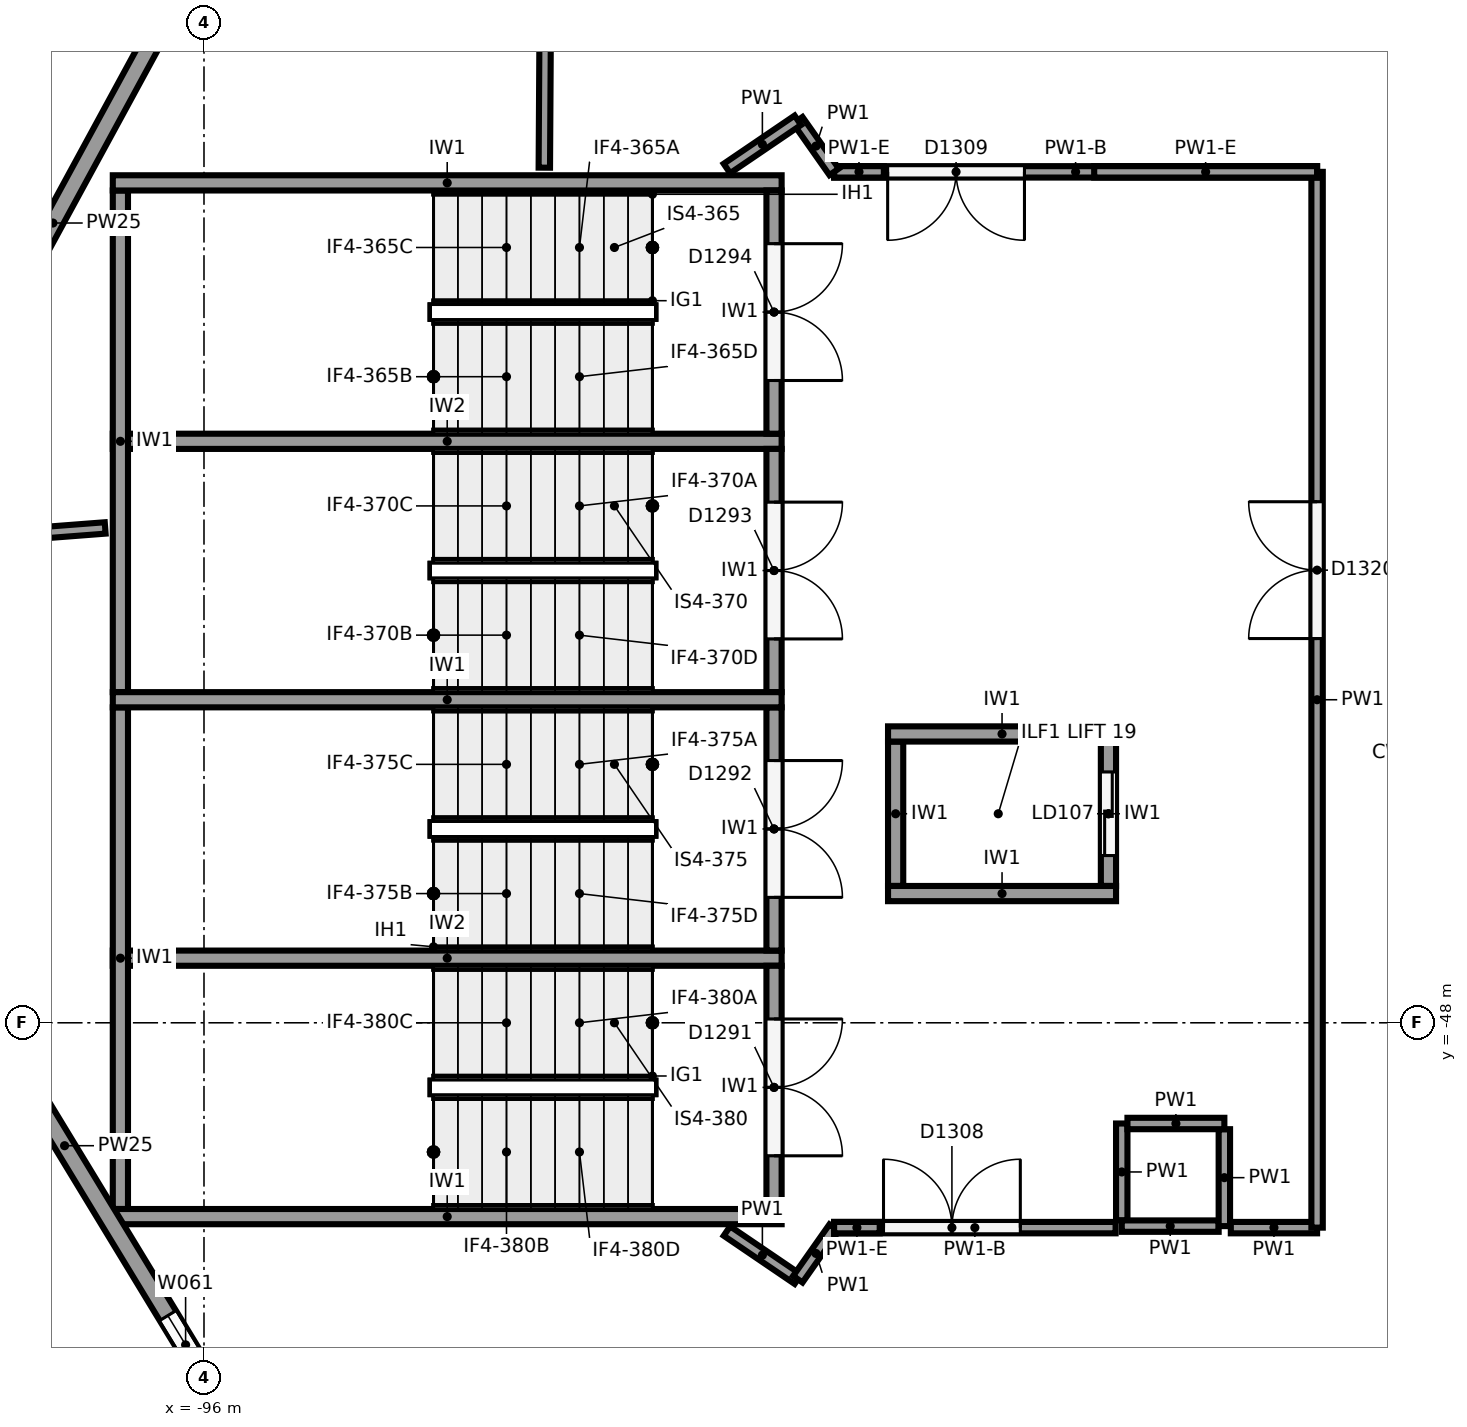
"""IFC4 building model, lengths in metres.
Left out: names, types, materials, properties, quantities, classifications, styles, units other than length and angle.
Written with IfcOpenShell. Run it as: python <this file> out.ifc"""

import sys

from ifc_helpers import new_model, si_unit, direction, frame, frame_2d, origin, origin_2d, place, context, subcontext, project, spatial, rectangle, circle, extrude, element, fill, save


model = new_model("IFC4")
c1 = context("Model", 3, precision=1e-05, world=origin(), true_north=direction((0.0, 1.0)))
c2 = subcontext(c1, "Body", "Model", "MODEL_VIEW")
j1 = project(units=[si_unit("LENGTHUNIT", "METRE"), si_unit("PLANEANGLEUNIT", "RADIAN")], contexts=[c1])
p1 = place(None, origin())
s1 = spatial("IfcSite", under=j1, at=p1, CompositionType="ELEMENT")
p2 = place(p1, origin())
s2 = spatial("IfcBuilding", under=s1, at=p2, CompositionType="ELEMENT")
p3 = place(p2, frame((0.0, 0.0, 18.0)))
s3 = spatial("IfcBuildingStorey", under=s2, at=p3, CompositionType="ELEMENT", Elevation=18.0)
p4 = place(p3, frame((-84.884, -42.562, 0.0), z_axis=(0.0, 0.0, 1.0), x_axis=(1.0, 0.0, 0.0)))
e1 = element("IfcColumn", 1, at=p4, inside=s3, PredefinedType="COLUMN", context=c2, shape_type="SweptSolid", body=[
    extrude(circle(Radius=0.6, at=origin_2d()), origin(), (0.0, 0.0, 1.0), 6.0),
])
p5 = place(p3, frame((-101.161, -43.311, 0.0), z_axis=(0.0, 0.0, 1.0), x_axis=(0.477867771117, 0.878431780691, 0.0)))
e2 = element("IfcWall", 2, at=p5, inside=s3, PredefinedType="SOLIDWALL", context=c2, shape_type="SweptSolid", body=[
    extrude(rectangle(XDim=13.28, YDim=0.25, at=frame_2d((6.64, 0.0))), origin(), (0.0, 0.0, 1.0), 4.3),
])
p6 = place(p3, frame((-94.528, -55.057, 0.0), z_axis=(0.0, 0.0, 1.0), x_axis=(-0.519362860044, 0.854553813172, 0.0)))
e3 = element("IfcWall", 3, at=p6, inside=s3, PredefinedType="SOLIDWALL", context=c2, shape_type="SweptSolid", body=[
    extrude(rectangle(XDim=12.732, YDim=0.25, at=frame_2d((6.366, 0.0))), origin(), (0.0, 0.0, 1.0), 4.3),
])
p7 = place(p6, frame((0.75, 0.0, 1.0)))
e4 = element("IfcOpeningElement", 4, at=p7, cuts=e3, PredefinedType="OPENING", context=c2, shape_type="SweptSolid", body=[
    extrude(rectangle(XDim=0.9, YDim=3.25, at=frame_2d((0.45, 1.625))), frame((0.0, 0.135, 0.0), z_axis=(0.0, -1.0, 0.0), x_axis=(1.0, 0.0, 0.0)), (0.0, 0.0, 1.0), 0.27),
])
p8 = place(p6, frame((2.851, 0.0, 1.0)))
e5 = element("IfcOpeningElement", 5, at=p8, cuts=e3, PredefinedType="OPENING", context=c2, shape_type="SweptSolid", body=[
    extrude(rectangle(XDim=0.9, YDim=3.25, at=frame_2d((0.45, 1.625))), frame((0.0, 0.135, 0.0), z_axis=(0.0, -1.0, 0.0), x_axis=(1.0, 0.0, 0.0)), (0.0, 0.0, 1.0), 0.27),
])
p9 = place(p6, frame((11.25, 0.0, 1.0)))
e6 = element("IfcOpeningElement", 6, at=p9, cuts=e3, PredefinedType="OPENING", context=c2, shape_type="SweptSolid", body=[
    extrude(rectangle(XDim=0.9, YDim=3.25, at=frame_2d((0.45, 1.625))), frame((0.0, 0.135, 0.0), z_axis=(0.0, -1.0, 0.0), x_axis=(1.0, 0.0, 0.0)), (0.0, 0.0, 1.0), 0.27),
])
for number, where, z_axis, x_axis in (
    (7, (-97.2, -36.95, 0.0), (0.0, 0.0, 1.0), (1.0, 0.0, 0.0)),
    (8, (-97.2, -43.75, 0.0), (0.0, 0.0, 1.0), (1.0, 0.0, 0.0)),
    (9, (-97.2, -50.55, 0.0), (0.0, 0.0, 1.0), (1.0, 0.0, 0.0)),
):
    element("IfcWall", number, at=place(p3, frame(where, z_axis=z_axis, x_axis=x_axis)), inside=s3, PredefinedType="SHEAR", context=c2, shape_type="SweptSolid", body=[
        extrude(rectangle(XDim=8.8, YDim=0.2, at=frame_2d((4.4, 0.0))), origin(), (0.0, 0.0, 1.0), 5.6),
    ])
for number, where, z_axis, x_axis in (
    (10, (-97.1, -37.05, 0.0), (0.0, 0.0, 1.0), (0.0, -1.0, 0.0)),
    (11, (-97.1, -43.85, 0.0), (0.0, 0.0, 1.0), (0.0, -1.0, 0.0)),
):
    element("IfcWall", number, at=place(p3, frame(where, z_axis=z_axis, x_axis=x_axis)), inside=s3, PredefinedType="SHEAR", context=c2, shape_type="SweptSolid", body=[
        extrude(rectangle(XDim=6.6, YDim=0.2, at=frame_2d((3.3, 0.0))), origin(), (0.0, 0.0, 1.0), 5.6),
    ])
for number, where, z_axis, x_axis in (
    (12, (-97.2, -40.35, 0.0), (0.0, 0.0, 1.0), (1.0, 0.0, 0.0)),
    (13, (-97.2, -47.15, 0.0), (0.0, 0.0, 1.0), (1.0, 0.0, 0.0)),
):
    element("IfcWall", number, at=place(p3, frame(where, z_axis=z_axis, x_axis=x_axis)), inside=s3, PredefinedType="SHEAR", context=c2, shape_type="SweptSolid", body=[
        extrude(rectangle(XDim=8.8, YDim=0.2, at=frame_2d((4.4, 0.0))), origin(), (0.0, 0.0, 1.0), 5.6),
    ])
p10 = place(p3, frame((-88.5, -37.05, 0.0), z_axis=(0.0, 0.0, 1.0), x_axis=(0.0, -1.0, 0.0)))
e14 = element("IfcWall", 14, at=p10, inside=s3, PredefinedType="SHEAR", context=c2, shape_type="SweptSolid", body=[
    extrude(rectangle(XDim=3.2, YDim=0.2, at=frame_2d((1.6, 0.0))), origin(), (0.0, 0.0, 1.0), 5.6),
])
p11 = place(p10, frame((0.7, 0.0, 0.0)))
e15 = element("IfcOpeningElement", 15, at=p11, cuts=e14, PredefinedType="OPENING", context=c2, shape_type="SweptSolid", body=[
    extrude(rectangle(XDim=1.8, YDim=2.1, at=frame_2d((0.9, 1.05))), frame((0.0, 0.11, 0.0), z_axis=(0.0, -1.0, 0.0), x_axis=(1.0, 0.0, 0.0)), (0.0, 0.0, 1.0), 0.22),
])
p12 = place(p3, frame((-88.5, -40.45, 0.0), z_axis=(0.0, 0.0, 1.0), x_axis=(0.0, -1.0, 0.0)))
e16 = element("IfcWall", 16, at=p12, inside=s3, PredefinedType="SHEAR", context=c2, shape_type="SweptSolid", body=[
    extrude(rectangle(XDim=3.2, YDim=0.2, at=frame_2d((1.6, 0.0))), origin(), (0.0, 0.0, 1.0), 5.6),
])
p13 = place(p12, frame((0.7, 0.0, 0.0)))
e17 = element("IfcOpeningElement", 17, at=p13, cuts=e16, PredefinedType="OPENING", context=c2, shape_type="SweptSolid", body=[
    extrude(rectangle(XDim=1.8, YDim=2.1, at=frame_2d((0.9, 1.05))), frame((0.0, 0.11, 0.0), z_axis=(0.0, -1.0, 0.0), x_axis=(1.0, 0.0, 0.0)), (0.0, 0.0, 1.0), 0.22),
])
p14 = place(p3, frame((-88.5, -43.85, 0.0), z_axis=(0.0, 0.0, 1.0), x_axis=(0.0, -1.0, 0.0)))
e18 = element("IfcWall", 18, at=p14, inside=s3, PredefinedType="SHEAR", context=c2, shape_type="SweptSolid", body=[
    extrude(rectangle(XDim=3.2, YDim=0.2, at=frame_2d((1.6, 0.0))), origin(), (0.0, 0.0, 1.0), 5.6),
])
p15 = place(p14, frame((0.7, 0.0, 0.0)))
e19 = element("IfcOpeningElement", 19, at=p15, cuts=e18, PredefinedType="OPENING", context=c2, shape_type="SweptSolid", body=[
    extrude(rectangle(XDim=1.8, YDim=2.1, at=frame_2d((0.9, 1.05))), frame((0.0, 0.11, 0.0), z_axis=(0.0, -1.0, 0.0), x_axis=(1.0, 0.0, 0.0)), (0.0, 0.0, 1.0), 0.22),
])
p16 = place(p3, frame((-88.5, -47.25, 0.0), z_axis=(0.0, 0.0, 1.0), x_axis=(0.0, -1.0, 0.0)))
e20 = element("IfcWall", 20, at=p16, inside=s3, PredefinedType="SHEAR", context=c2, shape_type="SweptSolid", body=[
    extrude(rectangle(XDim=3.2, YDim=0.2, at=frame_2d((1.6, 0.0))), origin(), (0.0, 0.0, 1.0), 5.6),
])
p17 = place(p16, frame((0.7, 0.0, 0.0)))
e21 = element("IfcOpeningElement", 21, at=p17, cuts=e20, PredefinedType="OPENING", context=c2, shape_type="SweptSolid", body=[
    extrude(rectangle(XDim=1.8, YDim=2.1, at=frame_2d((0.9, 1.05))), frame((0.0, 0.11, 0.0), z_axis=(0.0, -1.0, 0.0), x_axis=(1.0, 0.0, 0.0)), (0.0, 0.0, 1.0), 0.22),
])
for number, where, z_axis, x_axis in (
    (22, (-87.0, -44.2, 0.0), (0.0, 0.0, 1.0), (1.0, 0.0, 0.0)),
    (23, (-87.0, -46.3, 0.0), (0.0, 0.0, 1.0), (1.0, 0.0, 0.0)),
):
    element("IfcWall", number, at=place(p3, frame(where, z_axis=z_axis, x_axis=x_axis)), inside=s3, PredefinedType="SHEAR", context=c2, shape_type="SweptSolid", body=[
        extrude(rectangle(XDim=3.0, YDim=0.2, at=frame_2d((1.5, 0.0))), origin(), (0.0, 0.0, 1.0), 5.6),
    ])
p18 = place(p3, frame((-86.9, -44.3, 0.0), z_axis=(0.0, 0.0, 1.0), x_axis=(0.0, -1.0, 0.0)))
e24 = element("IfcWall", 24, at=p18, inside=s3, PredefinedType="SHEAR", context=c2, shape_type="SweptSolid", body=[
    extrude(rectangle(XDim=1.9, YDim=0.2, at=frame_2d((0.95, 0.0))), origin(), (0.0, 0.0, 1.0), 5.6),
])
p19 = place(p3, frame((-84.1, -44.3, 0.0), z_axis=(0.0, 0.0, 1.0), x_axis=(0.0, -1.0, 0.0)))
e25 = element("IfcWall", 25, at=p19, inside=s3, PredefinedType="SHEAR", context=c2, shape_type="SweptSolid", body=[
    extrude(rectangle(XDim=1.9, YDim=0.2, at=frame_2d((0.95, 0.0))), origin(), (0.0, 0.0, 1.0), 5.6),
])
p20 = place(p19, frame((0.4, 0.0, 0.0)))
e26 = element("IfcOpeningElement", 26, at=p20, cuts=e25, PredefinedType="OPENING", context=c2, shape_type="SweptSolid", body=[
    extrude(rectangle(XDim=1.1, YDim=2.1, at=frame_2d((0.55, 1.05))), frame((0.0, 0.11, 0.0), z_axis=(0.0, -1.0, 0.0), x_axis=(1.0, 0.0, 0.0)), (0.0, 0.0, 1.0), 0.22),
])
p21 = place(p3, frame((-97.3, -41.49, 0.0), z_axis=(0.0, 0.0, 1.0), x_axis=(-0.99706720675, -0.076530942913, 0.0)))
e27 = element("IfcWall", 27, at=p21, inside=s3, PredefinedType="PARTITIONING", context=c2, shape_type="SweptSolid", body=[
    extrude(rectangle(XDim=2.255, YDim=0.15, at=frame_2d((1.128, 0.0))), origin(), (0.0, 0.0, 1.0), 5.6),
])
p22 = place(p3, frame((-91.49, -31.489, 0.0), z_axis=(0.0, 0.0, 1.0), x_axis=(-0.006125459352, -0.999981239198, 0.0)))
e28 = element("IfcWall", 28, at=p22, inside=s3, PredefinedType="PARTITIONING", context=c2, shape_type="SweptSolid", body=[
    extrude(rectangle(XDim=5.261, YDim=0.15, at=frame_2d((2.63, 0.0))), origin(), (0.0, 0.0, 1.0), 5.6),
])
for number, where, z_axis, x_axis in (
    (29, (-83.925, -49.325, 0.0), (0.0, 0.0, 1.0), (0.0, -1.0, 0.0)),
    (30, (-83.925, -50.675, 0.0), (0.0, 0.0, 1.0), (1.0, 0.0, 0.0)),
    (31, (-82.575, -50.675, 0.0), (0.0, 0.0, 1.0), (0.0, 1.0, 0.0)),
    (32, (-82.575, -49.325, 0.0), (0.0, 0.0, 1.0), (-1.0, 0.0, 0.0)),
):
    element("IfcWall", number, at=place(p3, frame(where, z_axis=z_axis, x_axis=x_axis)), inside=s3, PredefinedType="PARTITIONING", context=c2, shape_type="SweptSolid", body=[
        extrude(rectangle(XDim=1.275, YDim=0.15, at=frame_2d((0.638, 0.0))), origin(), (0.0, 0.0, 1.0), 5.6),
    ])
p23 = place(p3, frame((-89.12, -50.74, 0.0), z_axis=(0.0, 0.0, 1.0), x_axis=(0.827055308354, -0.562120553728, 0.0)))
e33 = element("IfcWall", 33, at=p23, inside=s3, PredefinedType="PARTITIONING", context=c2, shape_type="SweptSolid", body=[
    extrude(rectangle(XDim=1.128, YDim=0.15, at=frame_2d((0.564, 0.0))), origin(), (0.0, 0.0, 1.0), 5.6),
])
p24 = place(p3, frame((-88.187, -51.374, 0.0), z_axis=(0.0, 0.0, 1.0), x_axis=(0.575376756214, 0.817888493872, 0.0)))
e34 = element("IfcWall", 34, at=p24, inside=s3, PredefinedType="PARTITIONING", context=c2, shape_type="SweptSolid", body=[
    extrude(rectangle(XDim=0.83, YDim=0.15, at=frame_2d((0.415, 0.0))), origin(), (0.0, 0.0, 1.0), 5.6),
])
p25 = place(p3, frame((-87.709, -50.695, 0.0), z_axis=(0.0, 0.0, 1.0), x_axis=(1.0, 0.0, 0.0)))
e35 = element("IfcWall", 35, at=p25, inside=s3, PredefinedType="PARTITIONING", context=c2, shape_type="SweptSolid", body=[
    extrude(rectangle(XDim=3.704, YDim=0.15, at=frame_2d((1.852, 0.0))), origin(), (0.0, 0.0, 1.0), 4.5),
])
p26 = place(p25, frame((0.65, 0.0, 0.0)))
e36 = element("IfcOpeningElement", 36, at=p26, cuts=e35, PredefinedType="OPENING", context=c2, shape_type="SweptSolid", body=[
    extrude(rectangle(XDim=1.8, YDim=2.1, at=frame_2d((0.9, 1.05))), frame((0.0, 0.085, 0.0), z_axis=(0.0, -1.0, 0.0), x_axis=(1.0, 0.0, 0.0)), (0.0, 0.0, 1.0), 0.17),
])
p27 = place(p3, frame((-87.709, -50.695, 4.5), z_axis=(0.0, 0.0, 1.0), x_axis=(1.0, 0.0, 0.0)))
e37 = element("IfcWall", 37, at=p27, inside=s3, PredefinedType="PARTITIONING", context=c2, shape_type="SweptSolid", body=[
    extrude(rectangle(XDim=0.6, YDim=0.15, at=frame_2d((0.3, 0.0))), origin(), (0.0, 0.0, 1.0), 1.1),
])
p28 = place(p3, frame((-82.49, -50.695, 0.0), z_axis=(0.0, 0.0, 1.0), x_axis=(1.0, 0.0, 0.0)))
e38 = element("IfcWall", 38, at=p28, inside=s3, PredefinedType="PARTITIONING", context=c2, shape_type="SweptSolid", body=[
    extrude(rectangle(XDim=1.135, YDim=0.15, at=frame_2d((0.567, 0.0))), origin(), (0.0, 0.0, 1.0), 5.6),
])
p29 = place(p3, frame((-81.355, -50.695, 0.0), z_axis=(0.0, 0.0, 1.0), x_axis=(0.0, 1.0, 0.0)))
e39 = element("IfcWall", 39, at=p29, inside=s3, PredefinedType="PARTITIONING", context=c2, shape_type="SweptSolid", body=[
    extrude(rectangle(XDim=13.89, YDim=0.15, at=frame_2d((6.945, 0.0))), origin(), (0.0, 0.0, 1.0), 5.6),
])
p30 = place(p29, frame((7.75, 0.0, 0.0)))
e40 = element("IfcOpeningElement", 40, at=p30, cuts=e39, PredefinedType="OPENING", context=c2, shape_type="SweptSolid", body=[
    extrude(rectangle(XDim=1.8, YDim=2.1, at=frame_2d((0.9, 1.05))), frame((0.0, 0.085, 0.0), z_axis=(0.0, -1.0, 0.0), x_axis=(1.0, 0.0, 0.0)), (0.0, 0.0, 1.0), 0.17),
])
p31 = place(p3, frame((-81.355, -36.805, 0.0), z_axis=(0.0, 0.0, 1.0), x_axis=(-1.0, 0.0, 0.0)))
e41 = element("IfcWall", 41, at=p31, inside=s3, PredefinedType="PARTITIONING", context=c2, shape_type="SweptSolid", body=[
    extrude(rectangle(XDim=6.354, YDim=0.15, at=frame_2d((3.177, 0.0))), origin(), (0.0, 0.0, 1.0), 4.5),
])
p32 = place(p31, frame((3.85, 0.0, 0.0)))
e42 = element("IfcOpeningElement", 42, at=p32, cuts=e41, PredefinedType="OPENING", context=c2, shape_type="SweptSolid", body=[
    extrude(rectangle(XDim=1.8, YDim=2.1, at=frame_2d((0.9, 1.05))), frame((0.0, 0.085, 0.0), z_axis=(0.0, -1.0, 0.0), x_axis=(1.0, 0.0, 0.0)), (0.0, 0.0, 1.0), 0.17),
])
p33 = place(p3, frame((-81.355, -36.805, 4.5), z_axis=(0.0, 0.0, 1.0), x_axis=(-1.0, 0.0, 0.0)))
e43 = element("IfcWall", 43, at=p33, inside=s3, PredefinedType="PARTITIONING", context=c2, shape_type="SweptSolid", body=[
    extrude(rectangle(XDim=2.933, YDim=0.15, at=frame_2d((1.466, 0.0))), origin(), (0.0, 0.0, 1.0), 1.1),
])
p34 = place(p3, frame((-87.055, -36.805, 4.5), z_axis=(0.0, 0.0, 1.0), x_axis=(-1.0, 0.0, 0.0)))
e44 = element("IfcWall", 44, at=p34, inside=s3, PredefinedType="PARTITIONING", context=c2, shape_type="SweptSolid", body=[
    extrude(rectangle(XDim=0.654, YDim=0.15, at=frame_2d((0.327, 0.0))), origin(), (0.0, 0.0, 1.0), 1.1),
])
p35 = place(p3, frame((-87.709, -36.805, 0.0), z_axis=(0.0, 0.0, 1.0), x_axis=(-0.575573582652, 0.81774999294, 0.0)))
e45 = element("IfcWall", 45, at=p35, inside=s3, PredefinedType="PARTITIONING", context=c2, shape_type="SweptSolid", body=[
    extrude(rectangle(XDim=0.83, YDim=0.15, at=frame_2d((0.415, 0.0))), origin(), (0.0, 0.0, 1.0), 5.6),
])
p36 = place(p3, frame((-88.187, -36.126, 0.0), z_axis=(0.0, 0.0, 1.0), x_axis=(-0.827055308354, -0.562120553728, 0.0)))
e46 = element("IfcWall", 46, at=p36, inside=s3, PredefinedType="PARTITIONING", context=c2, shape_type="SweptSolid", body=[
    extrude(rectangle(XDim=1.128, YDim=0.15, at=frame_2d((0.564, 0.0))), origin(), (0.0, 0.0, 1.0), 5.6),
])
p37 = place(p8, origin())
e47 = element("IfcWindow", 47, at=p37, inside=s3, PartitioningType="SINGLE_PANEL", PredefinedType="WINDOW", context=c2, shape_type="SweptSolid", body=[
    extrude(rectangle(XDim=0.9, YDim=3.25, at=frame_2d((0.45, 1.625))), frame((0.0, 0.03, 0.0), z_axis=(0.0, -1.0, 0.0), x_axis=(1.0, 0.0, 0.0)), (0.0, 0.0, 1.0), 0.06),
])
fill(e5, e47)
p38 = place(p11, origin())
e48 = element("IfcDoor", 48, at=p38, inside=s3, OperationType="DOUBLE_DOOR_SINGLE_SWING", PredefinedType="DOOR", context=c2, shape_type="SweptSolid", body=[
    extrude(rectangle(XDim=1.8, YDim=2.1, at=frame_2d((0.9, 1.05))), frame((0.0, 0.025, 0.0), z_axis=(0.0, -1.0, 0.0), x_axis=(1.0, 0.0, 0.0)), (0.0, 0.0, 1.0), 0.05),
])
fill(e15, e48)
p39 = place(p13, origin())
e49 = element("IfcDoor", 49, at=p39, inside=s3, OperationType="DOUBLE_DOOR_SINGLE_SWING", PredefinedType="DOOR", context=c2, shape_type="SweptSolid", body=[
    extrude(rectangle(XDim=1.8, YDim=2.1, at=frame_2d((0.9, 1.05))), frame((0.0, 0.025, 0.0), z_axis=(0.0, -1.0, 0.0), x_axis=(1.0, 0.0, 0.0)), (0.0, 0.0, 1.0), 0.05),
])
fill(e17, e49)
p40 = place(p15, origin())
e50 = element("IfcDoor", 50, at=p40, inside=s3, OperationType="DOUBLE_DOOR_SINGLE_SWING", PredefinedType="DOOR", context=c2, shape_type="SweptSolid", body=[
    extrude(rectangle(XDim=1.8, YDim=2.1, at=frame_2d((0.9, 1.05))), frame((0.0, 0.025, 0.0), z_axis=(0.0, -1.0, 0.0), x_axis=(1.0, 0.0, 0.0)), (0.0, 0.0, 1.0), 0.05),
])
fill(e19, e50)
p41 = place(p17, origin())
e51 = element("IfcDoor", 51, at=p41, inside=s3, OperationType="DOUBLE_DOOR_SINGLE_SWING", PredefinedType="DOOR", context=c2, shape_type="SweptSolid", body=[
    extrude(rectangle(XDim=1.8, YDim=2.1, at=frame_2d((0.9, 1.05))), frame((0.0, 0.025, 0.0), z_axis=(0.0, -1.0, 0.0), x_axis=(1.0, 0.0, 0.0)), (0.0, 0.0, 1.0), 0.05),
])
fill(e21, e51)
p42 = place(p20, origin())
e52 = element("IfcDoor", 52, at=p42, inside=s3, OperationType="SLIDING_TO_LEFT", PredefinedType="DOOR", context=c2, shape_type="SweptSolid", body=[
    extrude(rectangle(XDim=1.1, YDim=2.1, at=frame_2d((0.55, 1.05))), frame((0.0, 0.025, 0.0), z_axis=(0.0, -1.0, 0.0), x_axis=(1.0, 0.0, 0.0)), (0.0, 0.0, 1.0), 0.05),
])
fill(e26, e52)
p43 = place(p30, origin())
e53 = element("IfcDoor", 53, at=p43, inside=s3, OperationType="DOUBLE_DOOR_SINGLE_SWING", PredefinedType="DOOR", context=c2, shape_type="SweptSolid", body=[
    extrude(rectangle(XDim=1.8, YDim=2.1, at=frame_2d((0.9, 1.05))), frame((0.0, 0.025, 0.0), z_axis=(0.0, -1.0, 0.0), x_axis=(1.0, 0.0, 0.0)), (0.0, 0.0, 1.0), 0.05),
])
fill(e40, e53)
p44 = place(p26, origin())
e54 = element("IfcDoor", 54, at=p44, inside=s3, OperationType="DOUBLE_DOOR_SINGLE_SWING", PredefinedType="DOOR", context=c2, shape_type="SweptSolid", body=[
    extrude(rectangle(XDim=1.8, YDim=2.1, at=frame_2d((0.9, 1.05))), frame((0.0, 0.025, 0.0), z_axis=(0.0, -1.0, 0.0), x_axis=(1.0, 0.0, 0.0)), (0.0, 0.0, 1.0), 0.05),
])
fill(e36, e54)
p45 = place(p32, origin())
e55 = element("IfcDoor", 55, at=p45, inside=s3, OperationType="DOUBLE_DOOR_SINGLE_SWING", PredefinedType="DOOR", context=c2, shape_type="SweptSolid", body=[
    extrude(rectangle(XDim=1.8, YDim=2.1, at=frame_2d((0.9, 1.05))), frame((0.0, 0.025, 0.0), z_axis=(0.0, -1.0, 0.0), x_axis=(1.0, 0.0, 0.0)), (0.0, 0.0, 1.0), 0.05),
])
fill(e42, e55)
save(model, sys.argv[1])
